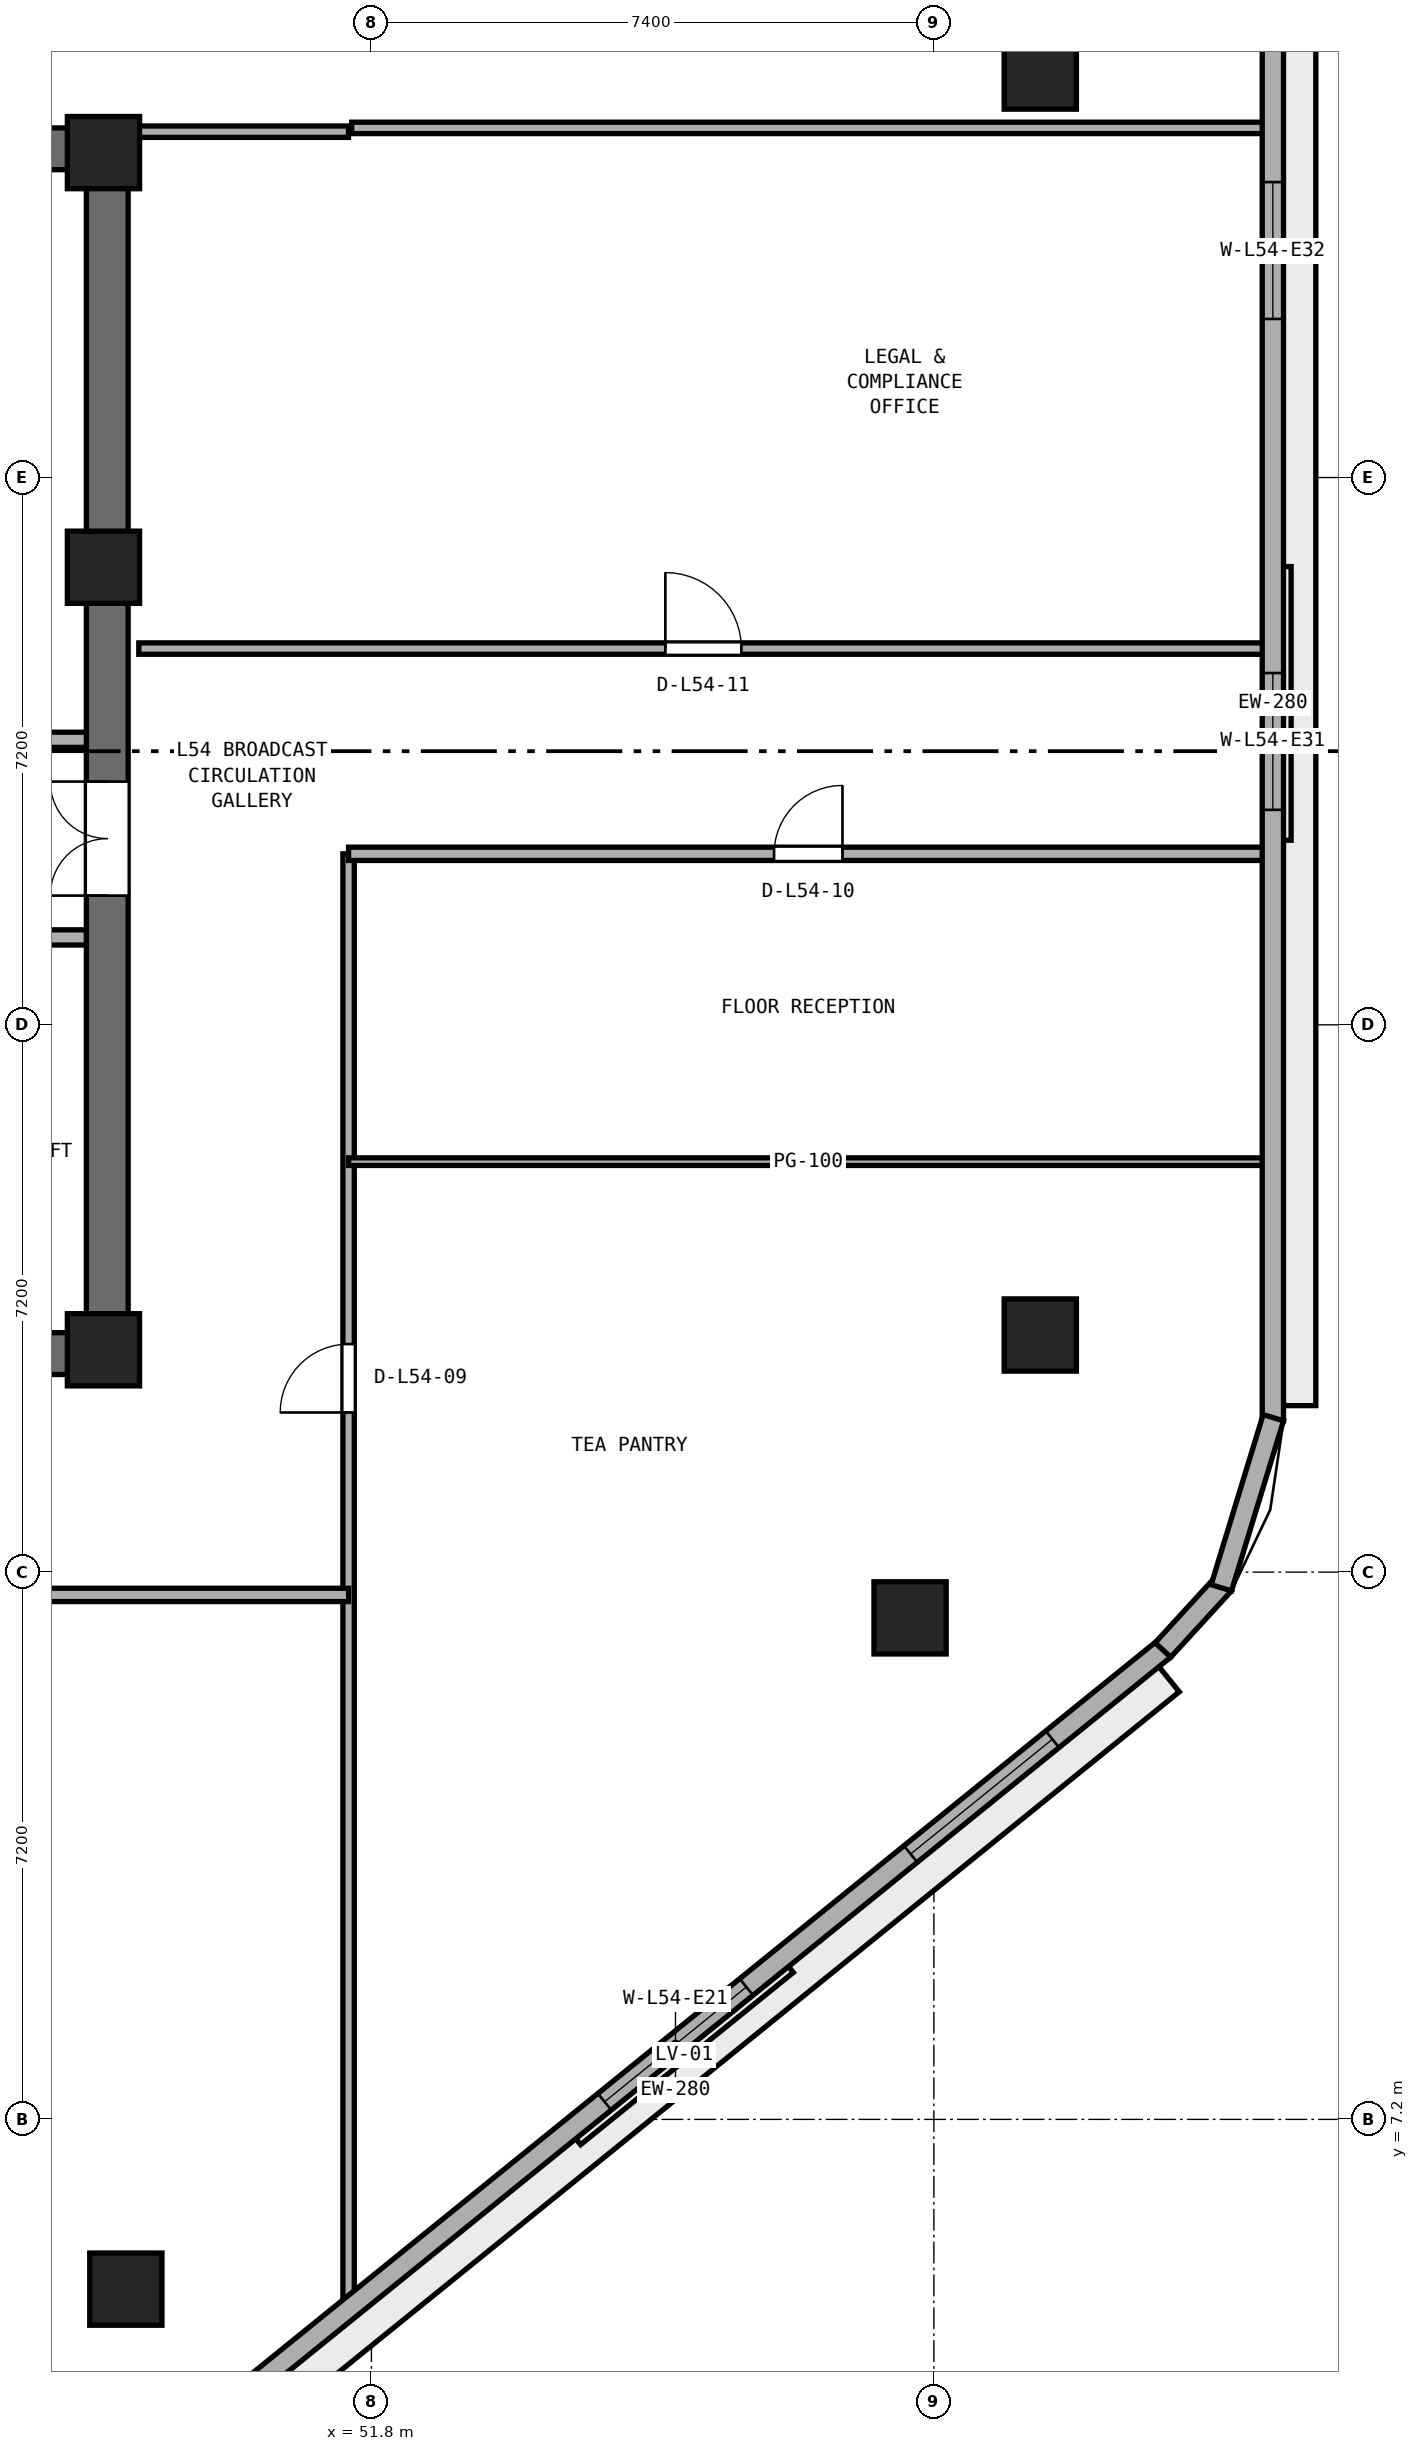
"""IFC4 building model, lengths in metres.
Left out: names, types, materials, properties, quantities, classifications, styles, units other than length and angle.
Written with IfcOpenShell. Run it as: python <this file> out.ifc"""

import sys

from ifc_helpers import new_model, si_unit, direction, frame, frame_2d, origin, origin_2d, place, context, subcontext, project, spatial, rectangle, extrude, element, fill, save


model = new_model("IFC4")
c1 = context("Model", 3, precision=1e-05, world=origin(), true_north=direction((0.0, 1.0)))
c2 = subcontext(c1, "Body", "Model", "MODEL_VIEW")
j1 = project(units=[si_unit("LENGTHUNIT", "METRE"), si_unit("PLANEANGLEUNIT", "RADIAN")], contexts=[c1])
p1 = place(None, origin())
s1 = spatial("IfcSite", under=j1, at=p1, CompositionType="ELEMENT")
p2 = place(p1, origin())
s2 = spatial("IfcBuilding", under=s1, at=p2, CompositionType="ELEMENT")
p3 = place(p2, frame((0.0, 0.0, 212.4)))
s3 = spatial("IfcBuildingStorey", under=s2, at=p3, CompositionType="ELEMENT", Elevation=212.4)
for number, where, z_axis, x_axis in (
    (1, (25.4, 17.275, 0.0), (0.0, 0.0, 1.0), (1.0, 0.0, 0.0)),
    (2, (25.4, 33.125, 0.0), (0.0, 0.0, 1.0), (1.0, 0.0, 0.0)),
):
    element("IfcWall", number, at=place(p3, frame(where, z_axis=z_axis, x_axis=x_axis)), inside=s3, PredefinedType="SHEAR", context=c2, shape_type="SweptSolid", body=[
        extrude(rectangle(XDim=23.2, YDim=0.55, at=frame_2d((11.6, 0.0))), origin(), (0.0, 0.0, 1.0), 3.54),
    ])
p4 = place(p3, frame((48.325, 17.55, 0.0), z_axis=(0.0, 0.0, 1.0), x_axis=(0.0, 1.0, 0.0)))
e3 = element("IfcWall", 3, at=p4, inside=s3, PredefinedType="SHEAR", context=c2, shape_type="SweptSolid", body=[
    extrude(rectangle(XDim=15.3, YDim=0.55, at=frame_2d((7.65, 0.0))), origin(), (0.0, 0.0, 1.0), 3.54),
])
p5 = place(p4, frame((5.75, 0.0, 0.0)))
e4 = element("IfcOpeningElement", 4, at=p5, cuts=e3, PredefinedType="OPENING", context=c2, shape_type="SweptSolid", body=[
    extrude(rectangle(XDim=1.5, YDim=2.15, at=frame_2d((0.75, 1.075))), frame((0.0, 0.285, 0.0), z_axis=(0.0, -1.0, 0.0), x_axis=(1.0, 0.0, 0.0)), (0.0, 0.0, 1.0), 0.57),
])
for number, where, z_axis, x_axis in (
    (5, (48.275, 17.325, 0.0), (0.0, 0.0, 1.0), (1.0, 0.0, 0.0)),
    (6, (48.275, 27.62, 0.0), (0.0, 0.0, 1.0), (1.0, 0.0, 0.0)),
    (7, (48.275, 33.075, 0.0), (0.0, 0.0, 1.0), (1.0, 0.0, 0.0)),
):
    element("IfcColumn", number, at=place(p3, frame(where, z_axis=z_axis, x_axis=x_axis)), inside=s3, PredefinedType="PILASTER", context=c2, shape_type="SweptSolid", body=[
        extrude(rectangle(XDim=0.95, YDim=0.95, at=origin_2d()), origin(), (0.0, 0.0, 1.0), 3.8),
    ])
for number, where, z_axis, x_axis in (
    (8, (48.57, 4.967, 0.0), (0.0, 0.0, 1.0), (1.0, 0.0, 0.0)),
    (9, (58.887, 13.798, 0.0), (0.0, 0.0, 1.0), (1.0, 0.0, 0.0)),
    (10, (60.6, 17.519, 0.0), (0.0, 0.0, 1.0), (1.0, 0.0, 0.0)),
    (11, (60.6, 34.122, 0.0), (0.0, 0.0, 1.0), (1.0, 0.0, 0.0)),
):
    element("IfcColumn", number, at=place(p3, frame(where, z_axis=z_axis, x_axis=x_axis)), inside=s3, PredefinedType="COLUMN", context=c2, shape_type="SweptSolid", body=[
        extrude(rectangle(XDim=0.95, YDim=0.95, at=origin_2d()), origin(), (0.0, 0.0, 1.0), 3.8),
    ])
p6 = place(p3, frame((42.0, 22.75, 0.0), z_axis=(0.0, 0.0, 1.0), x_axis=(1.0, 0.0, 0.0)))
e12 = element("IfcWall", 12, at=p6, inside=s3, PredefinedType="SOLIDWALL", context=c2, shape_type="SweptSolid", body=[
    extrude(rectangle(XDim=6.05, YDim=0.2, at=frame_2d((3.025, 0.0))), origin(), (0.0, 0.0, 1.0), 3.54),
])
p7 = place(p3, frame((46.1, 25.35, 0.0), z_axis=(0.0, 0.0, 1.0), x_axis=(1.0, 0.0, 0.0)))
e13 = element("IfcWall", 13, at=p7, inside=s3, PredefinedType="SOLIDWALL", context=c2, shape_type="SweptSolid", body=[
    extrude(rectangle(XDim=1.95, YDim=0.2, at=frame_2d((0.975, 0.0))), origin(), (0.0, 0.0, 1.0), 3.54),
])
p8 = place(p3, frame((51.5, 4.666, 0.0), z_axis=(0.0, 0.0, 1.0), x_axis=(0.0, 1.0, 0.0)))
e14 = element("IfcWall", 14, at=p8, inside=s3, PredefinedType="PARTITIONING", context=c2, shape_type="SweptSolid", body=[
    extrude(rectangle(XDim=19.184, YDim=0.15, at=frame_2d((9.592, 0.0))), origin(), (0.0, 0.0, 1.0), 3.54),
])
p9 = place(p8, frame((11.834, 0.0, 0.0)))
e15 = element("IfcOpeningElement", 15, at=p9, cuts=e14, PredefinedType="OPENING", context=c2, shape_type="SweptSolid", body=[
    extrude(rectangle(XDim=0.9, YDim=2.1, at=frame_2d((0.45, 1.05))), frame((0.0, 0.085, 0.0), z_axis=(0.0, -1.0, 0.0), x_axis=(1.0, 0.0, 0.0)), (0.0, 0.0, 1.0), 0.17),
])
p10 = place(p3, frame((22.5, 14.1, 0.0), z_axis=(0.0, 0.0, 1.0), x_axis=(1.0, 0.0, 0.0)))
e16 = element("IfcWall", 16, at=p10, inside=s3, PredefinedType="PARTITIONING", context=c2, shape_type="SweptSolid", body=[
    extrude(rectangle(XDim=29.0, YDim=0.175, at=frame_2d((14.5, 0.0))), origin(), (0.0, 0.0, 1.0), 3.54),
])
p11 = place(p10, frame((7.57, 0.0, 0.0)))
e17 = element("IfcOpeningElement", 17, at=p11, cuts=e16, PredefinedType="OPENING", context=c2, shape_type="SweptSolid", body=[
    extrude(rectangle(XDim=1.0, YDim=2.12, at=frame_2d((0.5, 1.06))), frame((0.0, 0.097, 0.0), z_axis=(0.0, -1.0, 0.0), x_axis=(1.0, 0.0, 0.0)), (0.0, 0.0, 1.0), 0.195),
])
p12 = place(p10, frame((21.88, 0.0, 0.0)))
e18 = element("IfcOpeningElement", 18, at=p12, cuts=e16, PredefinedType="OPENING", context=c2, shape_type="SweptSolid", body=[
    extrude(rectangle(XDim=0.9, YDim=2.1, at=frame_2d((0.45, 1.05))), frame((0.0, 0.097, 0.0), z_axis=(0.0, -1.0, 0.0), x_axis=(1.0, 0.0, 0.0)), (0.0, 0.0, 1.0), 0.195),
])
p13 = place(p3, frame((51.5, 19.8, 0.0), z_axis=(0.0, 0.0, 1.0), x_axis=(1.0, 0.0, 0.0)))
e19 = element("IfcWall", 19, at=p13, inside=s3, PredefinedType="PARTITIONING", context=c2, shape_type="SweptSolid", body=[
    extrude(rectangle(XDim=12.095, YDim=0.1, at=frame_2d((6.047, 0.0))), origin(), (0.0, 0.0, 1.0), 3.54),
])
p14 = place(p3, frame((51.5, 23.85, 0.0), z_axis=(0.0, 0.0, 1.0), x_axis=(1.0, 0.0, 0.0)))
e20 = element("IfcWall", 20, at=p14, inside=s3, PredefinedType="PARTITIONING", context=c2, shape_type="SweptSolid", body=[
    extrude(rectangle(XDim=12.095, YDim=0.175, at=frame_2d((6.047, 0.0))), origin(), (0.0, 0.0, 1.0), 3.54),
])
p15 = place(p14, frame((5.597, 0.0, 0.0)))
e21 = element("IfcOpeningElement", 21, at=p15, cuts=e20, PredefinedType="OPENING", context=c2, shape_type="SweptSolid", body=[
    extrude(rectangle(XDim=0.9, YDim=2.1, at=frame_2d((0.45, 1.05))), frame((0.0, 0.097, 0.0), z_axis=(0.0, -1.0, 0.0), x_axis=(1.0, 0.0, 0.0)), (0.0, 0.0, 1.0), 0.195),
])
p16 = place(p3, frame((48.74, 26.55, 0.0), z_axis=(0.0, 0.0, 1.0), x_axis=(1.0, 0.0, 0.0)))
e22 = element("IfcWall", 22, at=p16, inside=s3, PredefinedType="PARTITIONING", context=c2, shape_type="SweptSolid", body=[
    extrude(rectangle(XDim=14.855, YDim=0.15, at=frame_2d((7.427, 0.0))), origin(), (0.0, 0.0, 1.0), 3.54),
])
p17 = place(p16, frame((6.927, 0.0, 0.0)))
e23 = element("IfcOpeningElement", 23, at=p17, cuts=e22, PredefinedType="OPENING", context=c2, shape_type="SweptSolid", body=[
    extrude(rectangle(XDim=1.0, YDim=2.12, at=frame_2d((0.5, 1.06))), frame((0.0, 0.085, 0.0), z_axis=(0.0, -1.0, 0.0), x_axis=(1.0, 0.0, 0.0)), (0.0, 0.0, 1.0), 0.17),
])
p18 = place(p3, frame((48.74, 33.35, 0.0), z_axis=(0.0, 0.0, 1.0), x_axis=(1.0, 0.0, 0.0)))
e24 = element("IfcWall", 24, at=p18, inside=s3, PredefinedType="PARTITIONING", context=c2, shape_type="SweptSolid", body=[
    extrude(rectangle(XDim=2.759, YDim=0.15, at=frame_2d((1.379, 0.0))), origin(), (0.0, 0.0, 1.0), 2.923),
])
p19 = place(p3, frame((51.54, 33.4, 0.0), z_axis=(0.0, 0.0, 1.0), x_axis=(1.0, 0.0, 0.0)))
e25 = element("IfcWall", 25, at=p19, inside=s3, PredefinedType="PARTITIONING", context=c2, shape_type="SweptSolid", body=[
    extrude(rectangle(XDim=12.055, YDim=0.15, at=frame_2d((6.027, 0.0))), origin(), (0.0, 0.0, 1.0), 2.79),
])
p20 = place(p3, frame((49.372, 2.984, 0.0), z_axis=(0.0, 0.0, 1.0), x_axis=(0.777278899851, 0.629156190343, 0.0)))
e26 = element("IfcWall", 26, at=p20, inside=s3, PredefinedType="STANDARD", context=c2, shape_type="SweptSolid", body=[
    extrude(rectangle(XDim=16.54, YDim=0.28, at=frame_2d((8.27, 0.0))), origin(), (0.0, 0.0, 1.0), 3.54),
])
p21 = place(p20, frame((7.07, 0.0, 0.9)))
e27 = element("IfcOpeningElement", 27, at=p21, cuts=e26, PredefinedType="OPENING", context=c2, shape_type="SweptSolid", body=[
    extrude(rectangle(XDim=2.4, YDim=1.75, at=frame_2d((1.2, 0.875))), frame((0.0, 0.15, 0.0), z_axis=(0.0, -1.0, 0.0), x_axis=(1.0, 0.0, 0.0)), (0.0, 0.0, 1.0), 0.3),
])
p22 = place(p20, frame((12.25, 0.0, 0.9)))
e28 = element("IfcOpeningElement", 28, at=p22, cuts=e26, PredefinedType="OPENING", context=c2, shape_type="SweptSolid", body=[
    extrude(rectangle(XDim=2.4, YDim=1.75, at=frame_2d((1.2, 0.875))), frame((0.0, 0.15, 0.0), z_axis=(0.0, -1.0, 0.0), x_axis=(1.0, 0.0, 0.0)), (0.0, 0.0, 1.0), 0.3),
])
p23 = place(p3, frame((63.66, 16.39, 0.0), z_axis=(0.0, 0.0, 1.0), x_axis=(0.0, 1.0, 0.0)))
e29 = element("IfcWall", 29, at=p23, inside=s3, PredefinedType="STANDARD", context=c2, shape_type="SweptSolid", body=[
    extrude(rectangle(XDim=18.876, YDim=0.28, at=frame_2d((9.438, 0.0))), origin(), (0.0, 0.0, 1.0), 2.79),
])
p24 = place(p23, frame((8.038, 0.0, 0.85)))
e30 = element("IfcOpeningElement", 30, at=p24, cuts=e29, PredefinedType="OPENING", context=c2, shape_type="SweptSolid", body=[
    extrude(rectangle(XDim=1.8, YDim=1.2, at=frame_2d((0.9, 0.6))), frame((0.0, 0.15, 0.0), z_axis=(0.0, -1.0, 0.0), x_axis=(1.0, 0.0, 0.0)), (0.0, 0.0, 1.0), 0.3),
])
p25 = place(p23, frame((14.497, 0.0, 0.85)))
e31 = element("IfcOpeningElement", 31, at=p25, cuts=e29, PredefinedType="OPENING", context=c2, shape_type="SweptSolid", body=[
    extrude(rectangle(XDim=1.8, YDim=1.2, at=frame_2d((0.9, 0.6))), frame((0.0, 0.15, 0.0), z_axis=(0.0, -1.0, 0.0), x_axis=(1.0, 0.0, 0.0)), (0.0, 0.0, 1.0), 0.3),
])
p26 = place(p3, frame((62.213, 13.376, 0.0), z_axis=(0.0, 0.0, 1.0), x_axis=(0.675790054291, 0.737094161232, 0.0)))
e32 = element("IfcWall", 32, at=p26, inside=s3, PredefinedType="STANDARD", context=c2, shape_type="SweptSolid", body=[
    extrude(rectangle(XDim=1.183, YDim=0.28, at=frame_2d((0.591, 0.0))), origin(), (0.0, 0.0, 1.0), 3.54),
])
p27 = place(p3, frame((62.982, 14.194, 0.0), z_axis=(0.0, 0.0, 1.0), x_axis=(0.292398811023, 0.956296468315, 0.0)))
e33 = element("IfcWall", 33, at=p27, inside=s3, PredefinedType="STANDARD", context=c2, shape_type="SweptSolid", body=[
    extrude(rectangle(XDim=2.34, YDim=0.28, at=frame_2d((1.17, 0.0))), origin(), (0.0, 0.0, 1.0), 3.54),
])
p28 = place(p5, origin())
e34 = element("IfcDoor", 34, at=p28, inside=s3, OperationType="DOUBLE_DOOR_SINGLE_SWING", PredefinedType="DOOR", context=c2, shape_type="SweptSolid", body=[
    extrude(rectangle(XDim=1.5, YDim=2.15, at=frame_2d((0.75, 1.075))), frame((0.0, 0.025, 0.0), z_axis=(0.0, -1.0, 0.0), x_axis=(1.0, 0.0, 0.0)), (0.0, 0.0, 1.0), 0.05),
])
fill(e4, e34)
p29 = place(p9, origin())
e35 = element("IfcDoor", 35, at=p29, inside=s3, OperationType="SINGLE_SWING_LEFT", PredefinedType="DOOR", context=c2, shape_type="SweptSolid", body=[
    extrude(rectangle(XDim=0.9, YDim=2.1, at=frame_2d((0.45, 1.05))), frame((0.0, 0.025, 0.0), z_axis=(0.0, -1.0, 0.0), x_axis=(1.0, 0.0, 0.0)), (0.0, 0.0, 1.0), 0.05),
])
fill(e15, e35)
p30 = place(p15, origin())
e36 = element("IfcDoor", 36, at=p30, inside=s3, OperationType="SINGLE_SWING_RIGHT", PredefinedType="DOOR", context=c2, shape_type="SweptSolid", body=[
    extrude(rectangle(XDim=0.9, YDim=2.1, at=frame_2d((0.45, 1.05))), frame((0.0, 0.025, 0.0), z_axis=(0.0, -1.0, 0.0), x_axis=(1.0, 0.0, 0.0)), (0.0, 0.0, 1.0), 0.05),
])
fill(e21, e36)
p31 = place(p17, origin())
e37 = element("IfcDoor", 37, at=p31, inside=s3, OperationType="SINGLE_SWING_LEFT", PredefinedType="DOOR", context=c2, shape_type="SweptSolid", body=[
    extrude(rectangle(XDim=1.0, YDim=2.12, at=frame_2d((0.5, 1.06))), frame((0.0, 0.025, 0.0), z_axis=(0.0, -1.0, 0.0), x_axis=(1.0, 0.0, 0.0)), (0.0, 0.0, 1.0), 0.05),
])
fill(e23, e37)
p32 = place(p21, origin())
e38 = element("IfcWindow", 38, at=p32, inside=s3, PartitioningType="SINGLE_PANEL", PredefinedType="WINDOW", context=c2, shape_type="SweptSolid", body=[
    extrude(rectangle(XDim=2.4, YDim=1.75, at=frame_2d((1.2, 0.875))), frame((0.0, 0.03, 0.0), z_axis=(0.0, -1.0, 0.0), x_axis=(1.0, 0.0, 0.0)), (0.0, 0.0, 1.0), 0.06),
])
fill(e27, e38)
p33 = place(p22, origin())
e39 = element("IfcWindow", 39, at=p33, inside=s3, PartitioningType="SINGLE_PANEL", PredefinedType="WINDOW", context=c2, shape_type="SweptSolid", body=[
    extrude(rectangle(XDim=2.4, YDim=1.75, at=frame_2d((1.2, 0.875))), frame((0.0, 0.03, 0.0), z_axis=(0.0, -1.0, 0.0), x_axis=(1.0, 0.0, 0.0)), (0.0, 0.0, 1.0), 0.06),
])
fill(e28, e39)
p34 = place(p24, origin())
e40 = element("IfcWindow", 40, at=p34, inside=s3, PartitioningType="SINGLE_PANEL", PredefinedType="WINDOW", context=c2, shape_type="SweptSolid", body=[
    extrude(rectangle(XDim=1.8, YDim=1.2, at=frame_2d((0.9, 0.6))), frame((0.0, 0.03, 0.0), z_axis=(0.0, -1.0, 0.0), x_axis=(1.0, 0.0, 0.0)), (0.0, 0.0, 1.0), 0.06),
])
fill(e30, e40)
p35 = place(p25, origin())
e41 = element("IfcWindow", 41, at=p35, inside=s3, PartitioningType="SINGLE_PANEL", PredefinedType="WINDOW", context=c2, shape_type="SweptSolid", body=[
    extrude(rectangle(XDim=1.8, YDim=1.2, at=frame_2d((0.9, 0.6))), frame((0.0, 0.03, 0.0), z_axis=(0.0, -1.0, 0.0), x_axis=(1.0, 0.0, 0.0)), (0.0, 0.0, 1.0), 0.06),
])
fill(e31, e41)
save(model, sys.argv[1])
